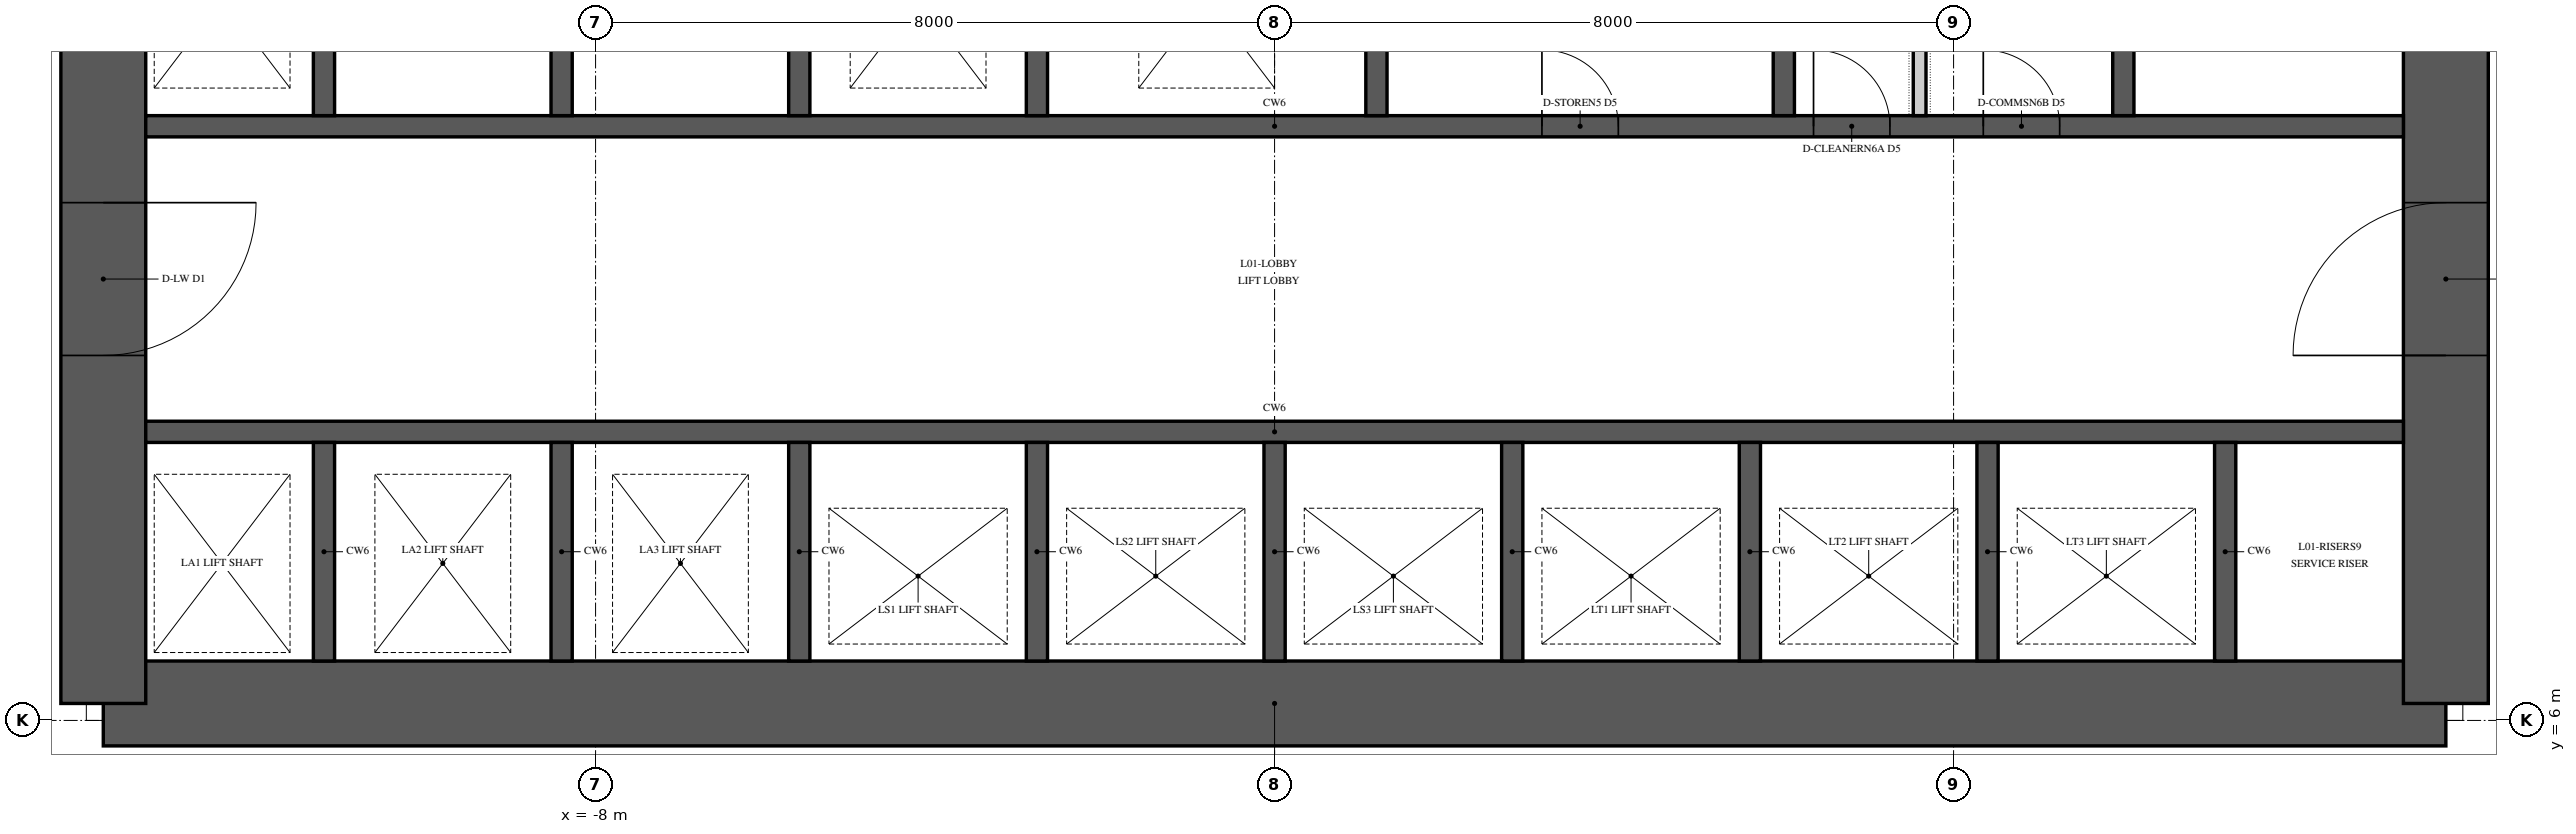
"""IFC4 building model, lengths in metres.
Left out: names, types, materials, properties, quantities, classifications, styles, units other than length and angle.
Written with IfcOpenShell. Run it as: python <this file> out.ifc"""

import sys

from ifc_helpers import new_model, si_unit, direction, frame, frame_2d, origin, place, context, subcontext, project, spatial, polyline, rectangle, outline, extrude, element, fill, save


model = new_model("IFC4")
c1 = context("Model", 3, precision=1e-05, world=origin(), true_north=direction((0.0, 1.0)))
c2 = subcontext(c1, "Body", "Model", "MODEL_VIEW")
j1 = project(units=[si_unit("LENGTHUNIT", "METRE"), si_unit("PLANEANGLEUNIT", "RADIAN")], contexts=[c1])
p1 = place(None, origin())
s1 = spatial("IfcSite", under=j1, at=p1, CompositionType="ELEMENT")
p2 = place(p1, origin())
s2 = spatial("IfcBuilding", under=s1, at=p2, CompositionType="ELEMENT")
p3 = place(p2, frame((0.0, 0.0, 6.0)))
s3 = spatial("IfcBuildingStorey", under=s2, at=p3, CompositionType="ELEMENT", Elevation=6.0)
p4 = place(p3, frame((-13.8, 6.2, 0.0), z_axis=(0.0, 0.0, 1.0), x_axis=(1.0, 0.0, 0.0)))
e1 = element("IfcWall", 1, at=p4, inside=s3, PredefinedType="SHEAR", context=c2, shape_type="SweptSolid", body=[
    extrude(rectangle(XDim=27.6, YDim=1.0, at=frame_2d((13.8, 0.0))), origin(), (0.0, 0.0, 1.0), 6.0),
])
p5 = place(p3, frame((13.8, 6.2, 0.0), z_axis=(0.0, 0.0, 1.0), x_axis=(0.0, 1.0, 0.0)))
e2 = element("IfcWall", 2, at=p5, inside=s3, PredefinedType="SHEAR", context=c2, shape_type="SweptSolid", body=[
    extrude(outline(polyline([(0.0, -0.5), (17.6, -0.5), (17.6, 0.0), (17.1, 0.0), (17.1, 0.5), (0.5, 0.5), (0.5, 0.0), (0.0, 0.0), (0.0, -0.5)])), origin(), (0.0, 0.0, 1.0), 6.0),
])
p6 = place(p5, frame((4.1, 0.0, 0.0)))
e3 = element("IfcOpeningElement", 3, at=p6, cuts=e2, PredefinedType="OPENING", context=c2, shape_type="SweptSolid", body=[
    extrude(rectangle(XDim=1.8, YDim=2.4, at=frame_2d((0.9, 1.2))), frame((0.0, 0.515, 0.0), z_axis=(0.0, -1.0, 0.0), x_axis=(1.0, 0.0, 0.0)), (0.0, 0.0, 1.0), 1.03),
])
p7 = place(p3, frame((-13.8, 23.8, 0.0), z_axis=(0.0, 0.0, 1.0), x_axis=(0.0, -1.0, 0.0)))
e4 = element("IfcWall", 4, at=p7, inside=s3, PredefinedType="SHEAR", context=c2, shape_type="SweptSolid", body=[
    extrude(outline(polyline([(0.0, -0.5), (17.6, -0.5), (17.6, 0.0), (17.1, 0.0), (17.1, 0.5), (0.5, 0.5), (0.5, 0.0), (0.0, 0.0), (0.0, -0.5)])), origin(), (0.0, 0.0, 1.0), 6.0),
])
p8 = place(p7, frame((11.7, 0.0, 0.0)))
e5 = element("IfcOpeningElement", 5, at=p8, cuts=e4, PredefinedType="OPENING", context=c2, shape_type="SweptSolid", body=[
    extrude(rectangle(XDim=1.8, YDim=2.4, at=frame_2d((0.9, 1.2))), frame((0.0, 0.515, 0.0), z_axis=(0.0, -1.0, 0.0), x_axis=(1.0, 0.0, 0.0)), (0.0, 0.0, 1.0), 1.03),
])
p9 = place(p3, frame((-13.3, 9.4, 0.0), z_axis=(0.0, 0.0, 1.0), x_axis=(1.0, 0.0, 0.0)))
e6 = element("IfcWall", 6, at=p9, inside=s3, PredefinedType="SHEAR", context=c2, shape_type="SweptSolid", body=[
    extrude(rectangle(XDim=26.6, YDim=0.25, at=frame_2d((13.3, 0.0))), origin(), (0.0, 0.0, 1.0), 6.0),
])
p10 = place(p3, frame((-13.3, 13.0, 0.0), z_axis=(0.0, 0.0, 1.0), x_axis=(1.0, 0.0, 0.0)))
e7 = element("IfcWall", 7, at=p10, inside=s3, PredefinedType="SHEAR", context=c2, shape_type="SweptSolid", body=[
    extrude(rectangle(XDim=26.6, YDim=0.25, at=frame_2d((13.3, 0.0))), origin(), (0.0, 0.0, 1.0), 6.0),
])
p11 = place(p10, frame((16.45, 0.0, 0.0)))
e8 = element("IfcOpeningElement", 8, at=p11, cuts=e7, PredefinedType="OPENING", context=c2, shape_type="SweptSolid", body=[
    extrude(rectangle(XDim=0.9, YDim=2.1, at=frame_2d((0.45, 1.05))), frame((0.0, 0.14, 0.0), z_axis=(0.0, -1.0, 0.0), x_axis=(1.0, 0.0, 0.0)), (0.0, 0.0, 1.0), 0.28),
])
p12 = place(p10, frame((19.65, 0.0, 0.0)))
e9 = element("IfcOpeningElement", 9, at=p12, cuts=e7, PredefinedType="OPENING", context=c2, shape_type="SweptSolid", body=[
    extrude(rectangle(XDim=0.9, YDim=2.1, at=frame_2d((0.45, 1.05))), frame((0.0, 0.14, 0.0), z_axis=(0.0, -1.0, 0.0), x_axis=(1.0, 0.0, 0.0)), (0.0, 0.0, 1.0), 0.28),
])
p13 = place(p10, frame((21.65, 0.0, 0.0)))
e10 = element("IfcOpeningElement", 10, at=p13, cuts=e7, PredefinedType="OPENING", context=c2, shape_type="SweptSolid", body=[
    extrude(rectangle(XDim=0.9, YDim=2.1, at=frame_2d((0.45, 1.05))), frame((0.0, 0.14, 0.0), z_axis=(0.0, -1.0, 0.0), x_axis=(1.0, 0.0, 0.0)), (0.0, 0.0, 1.0), 0.28),
])
for number, where, z_axis, x_axis in (
    (11, (-11.2, 6.7, 0.0), (0.0, 0.0, 1.0), (0.0, 1.0, 0.0)),
    (12, (-8.4, 6.7, 0.0), (0.0, 0.0, 1.0), (0.0, 1.0, 0.0)),
    (13, (-5.6, 6.7, 0.0), (0.0, 0.0, 1.0), (0.0, 1.0, 0.0)),
    (14, (-2.8, 6.7, 0.0), (0.0, 0.0, 1.0), (0.0, 1.0, 0.0)),
    (15, (0.0, 6.7, 0.0), (0.0, 0.0, 1.0), (0.0, 1.0, 0.0)),
    (16, (2.8, 6.7, 0.0), (0.0, 0.0, 1.0), (0.0, 1.0, 0.0)),
    (17, (5.6, 6.7, 0.0), (0.0, 0.0, 1.0), (0.0, 1.0, 0.0)),
    (18, (8.4, 6.7, 0.0), (0.0, 0.0, 1.0), (0.0, 1.0, 0.0)),
    (19, (11.2, 6.7, 0.0), (0.0, 0.0, 1.0), (0.0, 1.0, 0.0)),
):
    element("IfcWall", number, at=place(p3, frame(where, z_axis=z_axis, x_axis=x_axis)), inside=s3, PredefinedType="SHEAR", context=c2, shape_type="SweptSolid", body=[
        extrude(rectangle(XDim=2.575, YDim=0.25, at=frame_2d((1.288, 0.0))), origin(), (0.0, 0.0, 1.0), 6.0),
    ])
for number, where, z_axis, x_axis in (
    (20, (-11.2, 13.125, 0.0), (0.0, 0.0, 1.0), (0.0, 1.0, 0.0)),
    (21, (-8.4, 13.125, 0.0), (0.0, 0.0, 1.0), (0.0, 1.0, 0.0)),
    (22, (-5.6, 13.125, 0.0), (0.0, 0.0, 1.0), (0.0, 1.0, 0.0)),
    (23, (-2.8, 13.125, 0.0), (0.0, 0.0, 1.0), (0.0, 1.0, 0.0)),
    (24, (1.2, 13.125, 0.0), (0.0, 0.0, 1.0), (0.0, 1.0, 0.0)),
    (25, (6.0, 13.125, 0.0), (0.0, 0.0, 1.0), (0.0, 1.0, 0.0)),
    (26, (10.0, 13.125, 0.0), (0.0, 0.0, 1.0), (0.0, 1.0, 0.0)),
):
    element("IfcWall", number, at=place(p3, frame(where, z_axis=z_axis, x_axis=x_axis)), inside=s3, PredefinedType="SHEAR", context=c2, shape_type="SweptSolid", body=[
        extrude(rectangle(XDim=2.75, YDim=0.25, at=frame_2d((1.375, 0.0))), origin(), (0.0, 0.0, 1.0), 6.0),
    ])
p14 = place(p3, frame((7.6, 13.125, 0.0), z_axis=(0.0, 0.0, 1.0), x_axis=(0.0, 1.0, 0.0)))
e27 = element("IfcWall", 27, at=p14, inside=s3, PredefinedType="PARTITIONING", context=c2, shape_type="SweptSolid", body=[
    extrude(rectangle(XDim=2.75, YDim=0.15, at=frame_2d((1.375, 0.0))), origin(), (0.0, 0.0, 1.0), 5.85),
])
p15 = place(p6, origin())
e28 = element("IfcDoor", 28, at=p15, inside=s3, OperationType="DOUBLE_DOOR_SINGLE_SWING", PredefinedType="DOOR", context=c2, shape_type="SweptSolid", body=[
    extrude(rectangle(XDim=1.8, YDim=2.4, at=frame_2d((0.9, 1.2))), frame((0.0, 0.5, 0.0), z_axis=(0.0, -1.0, 0.0), x_axis=(1.0, 0.0, 0.0)), (0.0, 0.0, 1.0), 1.0),
])
fill(e3, e28)
p16 = place(p8, origin())
e29 = element("IfcDoor", 29, at=p16, inside=s3, OperationType="DOUBLE_DOOR_SINGLE_SWING", PredefinedType="DOOR", context=c2, shape_type="SweptSolid", body=[
    extrude(rectangle(XDim=1.8, YDim=2.4, at=frame_2d((0.9, 1.2))), frame((0.0, 0.5, 0.0), z_axis=(0.0, -1.0, 0.0), x_axis=(1.0, 0.0, 0.0)), (0.0, 0.0, 1.0), 1.0),
])
fill(e5, e29)
p17 = place(p11, origin())
e30 = element("IfcDoor", 30, at=p17, inside=s3, OperationType="SINGLE_SWING_LEFT", PredefinedType="DOOR", context=c2, shape_type="SweptSolid", body=[
    extrude(rectangle(XDim=0.9, YDim=2.1, at=frame_2d((0.45, 1.05))), frame((0.0, 0.125, 0.0), z_axis=(0.0, -1.0, 0.0), x_axis=(1.0, 0.0, 0.0)), (0.0, 0.0, 1.0), 0.25),
])
fill(e8, e30)
p18 = place(p12, origin())
e31 = element("IfcDoor", 31, at=p18, inside=s3, OperationType="SINGLE_SWING_LEFT", PredefinedType="DOOR", context=c2, shape_type="SweptSolid", body=[
    extrude(rectangle(XDim=0.9, YDim=2.1, at=frame_2d((0.45, 1.05))), frame((0.0, 0.125, 0.0), z_axis=(0.0, -1.0, 0.0), x_axis=(1.0, 0.0, 0.0)), (0.0, 0.0, 1.0), 0.25),
])
fill(e9, e31)
p19 = place(p13, origin())
e32 = element("IfcDoor", 32, at=p19, inside=s3, OperationType="SINGLE_SWING_LEFT", PredefinedType="DOOR", context=c2, shape_type="SweptSolid", body=[
    extrude(rectangle(XDim=0.9, YDim=2.1, at=frame_2d((0.45, 1.05))), frame((0.0, 0.125, 0.0), z_axis=(0.0, -1.0, 0.0), x_axis=(1.0, 0.0, 0.0)), (0.0, 0.0, 1.0), 0.25),
])
fill(e10, e32)
save(model, sys.argv[1])
